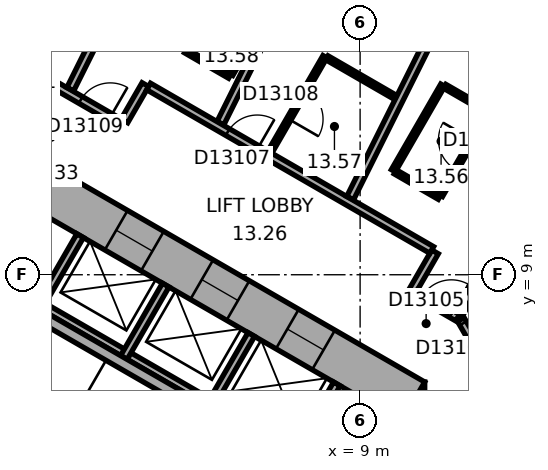
"""IFC4 building model, lengths in metres.
Left out: names, types, materials, properties, quantities, classifications, styles, units other than length and angle.
Written with IfcOpenShell. Run it as: python <this file> out.ifc"""

import sys

from ifc_helpers import new_model, si_unit, direction, frame, frame_2d, origin, place, context, subcontext, project, spatial, rectangle, extrude, element, fill, save


model = new_model("IFC4")
c1 = context("Model", 3, precision=1e-05, world=origin(), true_north=direction((0.0, 1.0)))
c2 = subcontext(c1, "Body", "Model", "MODEL_VIEW")
j1 = project(units=[si_unit("LENGTHUNIT", "METRE"), si_unit("PLANEANGLEUNIT", "RADIAN")], contexts=[c1])
p1 = place(None, origin())
s1 = spatial("IfcSite", under=j1, at=p1, CompositionType="ELEMENT")
p2 = place(p1, origin())
s2 = spatial("IfcBuilding", under=s1, at=p2, CompositionType="ELEMENT")
p3 = place(p2, frame((0.0, 0.0, 63.8)))
s3 = spatial("IfcBuildingStorey", under=s2, at=p3, CompositionType="ELEMENT", Elevation=63.8)
p4 = place(p3, frame((10.1, -6.177, 0.0), z_axis=(0.0, 0.0, 1.0), x_axis=(0.0, 1.0, 0.0)))
e1 = element("IfcWall", 1, at=p4, inside=s3, PredefinedType="SHEAR", context=c2, shape_type="SweptSolid", body=[
    extrude(rectangle(XDim=12.355, YDim=1.2, at=frame_2d((6.177, 0.0))), origin(), (0.0, 0.0, 1.0), 3.3),
])
p5 = place(p4, frame((6.378, 0.0, 0.0)))
e2 = element("IfcOpeningElement", 2, at=p5, cuts=e1, PredefinedType="OPENING", context=c2, shape_type="SweptSolid", body=[
    extrude(rectangle(XDim=1.5, YDim=2.1, at=frame_2d((0.75, 1.05))), frame((0.0, 0.61, 0.0), z_axis=(0.0, -1.0, 0.0), x_axis=(1.0, 0.0, 0.0)), (0.0, 0.0, 1.0), 1.22),
])
p6 = place(p4, frame((1.828, 0.0, 0.0)))
e3 = element("IfcOpeningElement", 3, at=p6, cuts=e1, PredefinedType="OPENING", context=c2, shape_type="SweptSolid", body=[
    extrude(rectangle(XDim=1.1, YDim=2.1, at=frame_2d((0.55, 1.05))), frame((0.0, 0.61, 0.0), z_axis=(0.0, -1.0, 0.0), x_axis=(1.0, 0.0, 0.0)), (0.0, 0.0, 1.0), 1.22),
])
p7 = place(p4, frame((4.427, 0.0, 0.0)))
e4 = element("IfcOpeningElement", 4, at=p7, cuts=e1, PredefinedType="OPENING", context=c2, shape_type="SweptSolid", body=[
    extrude(rectangle(XDim=1.1, YDim=2.1, at=frame_2d((0.55, 1.05))), frame((0.0, 0.61, 0.0), z_axis=(0.0, -1.0, 0.0), x_axis=(1.0, 0.0, 0.0)), (0.0, 0.0, 1.0), 1.22),
])
p8 = place(p3, frame((10.4, 5.658, 0.0), z_axis=(0.0, 0.0, 1.0), x_axis=(-0.866021384402, 0.500006961711, 0.0)))
e5 = element("IfcWall", 5, at=p8, inside=s3, PredefinedType="SHEAR", context=c2, shape_type="SweptSolid", body=[
    extrude(rectangle(XDim=12.355, YDim=1.2, at=frame_2d((6.178, 0.0))), origin(), (0.0, 0.0, 1.0), 3.3),
])
p9 = place(p8, frame((2.728, 0.0, 0.0)))
e6 = element("IfcOpeningElement", 6, at=p9, cuts=e5, PredefinedType="OPENING", context=c2, shape_type="SweptSolid", body=[
    extrude(rectangle(XDim=1.1, YDim=2.1, at=frame_2d((0.55, 1.05))), frame((0.0, 0.61, 0.0), z_axis=(0.0, -1.0, 0.0), x_axis=(1.0, 0.0, 0.0)), (0.0, 0.0, 1.0), 1.22),
])
p10 = place(p8, frame((5.328, 0.0, 0.0)))
e7 = element("IfcOpeningElement", 7, at=p10, cuts=e5, PredefinedType="OPENING", context=c2, shape_type="SweptSolid", body=[
    extrude(rectangle(XDim=1.1, YDim=2.1, at=frame_2d((0.55, 1.05))), frame((0.0, 0.61, 0.0), z_axis=(0.0, -1.0, 0.0), x_axis=(1.0, 0.0, 0.0)), (0.0, 0.0, 1.0), 1.22),
])
p11 = place(p8, frame((7.928, 0.0, 0.0)))
e8 = element("IfcOpeningElement", 8, at=p11, cuts=e5, PredefinedType="OPENING", context=c2, shape_type="SweptSolid", body=[
    extrude(rectangle(XDim=1.1, YDim=2.1, at=frame_2d((0.55, 1.05))), frame((0.0, 0.61, 0.0), z_axis=(0.0, -1.0, 0.0), x_axis=(1.0, 0.0, 0.0)), (0.0, 0.0, 1.0), 1.22),
])
p12 = place(p3, frame((7.424, 4.259, 0.0), z_axis=(0.0, 0.0, 1.0), x_axis=(-0.866026010844, 0.49999894854, 0.0)))
e9 = element("IfcWall", 9, at=p12, inside=s3, PredefinedType="PARTITIONING", context=c2, shape_type="SweptSolid", body=[
    extrude(rectangle(XDim=8.0, YDim=0.2, at=frame_2d((4.0, 0.0))), origin(), (0.0, 0.0, 1.0), 3.05),
])
for number, where, z_axis, x_axis in (
    (10, (7.287, 4.222, 0.0), (0.0, 0.0, 1.0), (0.5, 0.866, 0.0)),
    (11, (5.036, 5.522, 0.0), (0.0, 0.0, 1.0), (0.5, 0.866, 0.0)),
    (12, (2.784, 6.822, 0.0), (0.0, 0.0, 1.0), (0.5, 0.866, 0.0)),
    (13, (0.532, 8.122, 0.0), (0.0, 0.0, 1.0), (0.5, 0.866, 0.0)),
):
    element("IfcWall", number, at=place(p3, frame(where, z_axis=z_axis, x_axis=x_axis)), inside=s3, PredefinedType="PARTITIONING", context=c2, shape_type="SweptSolid", body=[
        extrude(rectangle(XDim=2.2, YDim=0.2, at=frame_2d((1.1, 0.0))), origin(), (0.0, 0.0, 1.0), 3.05),
    ])
p13 = place(p3, frame((6.303, 4.617, 0.0), z_axis=(0.0, 0.0, 1.0), x_axis=(-0.866027801685, 0.499995846692, 0.0)))
e14 = element("IfcWall", 14, at=p13, inside=s3, PredefinedType="SHEAR", context=c2, shape_type="SweptSolid", body=[
    extrude(rectangle(XDim=7.06, YDim=0.3, at=frame_2d((3.53, 0.0))), origin(), (0.0, 0.0, 1.0), 3.05),
])
p14 = place(p3, frame((0.95, 14.001, 0.0), z_axis=(0.0, 0.0, 1.0), x_axis=(-1.0, 0.0, 0.0)))
e15 = element("IfcWall", 15, at=p14, inside=s3, PredefinedType="PARTITIONING", context=c2, shape_type="SweptSolid", body=[
    extrude(rectangle(XDim=1.86, YDim=0.2, at=frame_2d((0.93, 0.0))), origin(), (0.0, 0.0, 1.0), 3.05),
])
p15 = place(p14, frame((0.48, 0.0, 0.0)))
e16 = element("IfcOpeningElement", 16, at=p15, cuts=e15, PredefinedType="OPENING", context=c2, shape_type="SweptSolid", body=[
    extrude(rectangle(XDim=0.9, YDim=2.1, at=frame_2d((0.45, 1.05))), frame((0.0, 0.11, 0.0), z_axis=(0.0, -1.0, 0.0), x_axis=(1.0, 0.0, 0.0)), (0.0, 0.0, 1.0), 0.22),
])
p16 = place(p3, frame((2.748, 12.962, 0.0), z_axis=(0.0, 0.0, 1.0), x_axis=(-0.866013897511, 0.50001992892, 0.0)))
e17 = element("IfcWall", 17, at=p16, inside=s3, PredefinedType="PARTITIONING", context=c2, shape_type="SweptSolid", body=[
    extrude(rectangle(XDim=2.037, YDim=0.2, at=frame_2d((1.018, 0.0))), origin(), (0.0, 0.0, 1.0), 3.05),
])
p17 = place(p16, frame((0.372, 0.0, 0.0)))
e18 = element("IfcOpeningElement", 18, at=p17, cuts=e17, PredefinedType="OPENING", context=c2, shape_type="SweptSolid", body=[
    extrude(rectangle(XDim=0.9, YDim=2.1, at=frame_2d((0.45, 1.05))), frame((0.0, 0.11, 0.0), z_axis=(0.0, -1.0, 0.0), x_axis=(1.0, 0.0, 0.0)), (0.0, 0.0, 1.0), 0.22),
])
p18 = place(p3, frame((3.349, 14.002, 0.0), z_axis=(0.0, 0.0, 1.0), x_axis=(-0.500074377092, -0.865982457891, 0.0)))
e19 = element("IfcWall", 19, at=p18, inside=s3, PredefinedType="PARTITIONING", context=c2, shape_type="SweptSolid", body=[
    extrude(rectangle(XDim=1.101, YDim=0.2, at=frame_2d((0.55, 0.0))), origin(), (0.0, 0.0, 1.0), 3.05),
])
p19 = place(p3, frame((5.351, 21.859, 0.0), z_axis=(0.0, 0.0, 1.0), x_axis=(-0.446205309328, -0.894930624086, 0.0)))
e20 = element("IfcWall", 20, at=p19, inside=s3, PredefinedType="PARTITIONING", context=c2, shape_type="SweptSolid", body=[
    extrude(rectangle(XDim=8.913, YDim=0.2, at=frame_2d((4.457, 0.0))), origin(), (0.0, 0.0, 1.0), 2.6),
])
p20 = place(p3, frame((5.569, 14.222, 0.0), z_axis=(0.0, 0.0, 1.0), x_axis=(-0.866036909293, 0.499980071345, 0.0)))
e21 = element("IfcWall", 21, at=p20, inside=s3, PredefinedType="PARTITIONING", context=c2, shape_type="SweptSolid", body=[
    extrude(rectangle(XDim=1.34, YDim=0.12, at=frame_2d((0.67, 0.0))), origin(), (0.0, 0.0, 1.0), 3.05),
])
p21 = place(p3, frame((6.625, 12.227, 0.0), z_axis=(0.0, 0.0, 1.0), x_axis=(0.500023687443, 0.866011727401, 0.0)))
e22 = element("IfcWall", 22, at=p21, inside=s3, PredefinedType="PARTITIONING", context=c2, shape_type="SweptSolid", body=[
    extrude(rectangle(XDim=2.9, YDim=0.12, at=frame_2d((1.45, 0.0))), origin(), (0.0, 0.0, 1.0), 3.05),
])
p22 = place(p21, frame((1.0, 0.0, 0.0)))
e23 = element("IfcOpeningElement", 23, at=p22, cuts=e22, PredefinedType="OPENING", context=c2, shape_type="SweptSolid", body=[
    extrude(rectangle(XDim=0.9, YDim=2.1, at=frame_2d((0.45, 1.05))), frame((0.0, 0.07, 0.0), z_axis=(0.0, -1.0, 0.0), x_axis=(1.0, 0.0, 0.0)), (0.0, 0.0, 1.0), 0.14),
])
p23 = place(p3, frame((6.839, 16.422, 0.0), z_axis=(0.0, 0.0, 1.0), x_axis=(-0.50000366821, -0.866023285932, 0.0)))
e24 = element("IfcWall", 24, at=p23, inside=s3, PredefinedType="PARTITIONING", context=c2, shape_type="SweptSolid", body=[
    extrude(rectangle(XDim=2.48, YDim=0.12, at=frame_2d((1.24, 0.0))), origin(), (0.0, 0.0, 1.0), 3.05),
])
p24 = place(p3, frame((8.127, 14.708, 0.0), z_axis=(0.0, 0.0, 1.0), x_axis=(0.866065472234, -0.499930592986, 0.0)))
e25 = element("IfcWall", 25, at=p24, inside=s3, PredefinedType="PARTITIONING", context=c2, shape_type="SweptSolid", body=[
    extrude(rectangle(XDim=2.098, YDim=0.12, at=frame_2d((1.049, 0.0))), origin(), (0.0, 0.0, 1.0), 3.05),
])
p25 = place(p3, frame((8.872, 20.104, 0.0), z_axis=(0.0, 0.0, 1.0), x_axis=(-0.446218378653, -0.894924107706, 0.0)))
e26 = element("IfcWall", 26, at=p25, inside=s3, PredefinedType="PARTITIONING", context=c2, shape_type="SweptSolid", body=[
    extrude(rectangle(XDim=7.95, YDim=0.2, at=frame_2d((3.975, 0.0))), origin(), (0.0, 0.0, 1.0), 3.05),
])
p26 = place(p3, frame((9.875, 11.736, 0.0), z_axis=(0.0, 0.0, 1.0), x_axis=(0.499936506574, 0.866062058628, 0.0)))
e27 = element("IfcWall", 27, at=p26, inside=s3, PredefinedType="PARTITIONING", context=c2, shape_type="SweptSolid", body=[
    extrude(rectangle(XDim=2.6, YDim=0.12, at=frame_2d((1.3, 0.0))), origin(), (0.0, 0.0, 1.0), 3.05),
])
p27 = place(p3, frame((10.371, 8.561, 0.0), z_axis=(0.0, 0.0, 1.0), x_axis=(0.499986357472, 0.866033280158, 0.0)))
e28 = element("IfcWall", 28, at=p27, inside=s3, PredefinedType="PARTITIONING", context=c2, shape_type="SweptSolid", body=[
    extrude(rectangle(XDim=1.201, YDim=0.2, at=frame_2d((0.601, 0.0))), origin(), (0.0, 0.0, 1.0), 3.05),
])
p28 = place(p3, frame((10.885, 9.652, 0.0), z_axis=(0.0, 0.0, 1.0), x_axis=(-0.866033868542, 0.499985338323, 0.0)))
e29 = element("IfcWall", 29, at=p28, inside=s3, PredefinedType="PARTITIONING", context=c2, shape_type="SweptSolid", body=[
    extrude(rectangle(XDim=8.602, YDim=0.2, at=frame_2d((4.301, 0.0))), origin(), (0.0, 0.0, 1.0), 3.05),
])
p29 = place(p28, frame((5.302, 0.0, 0.0)))
e30 = element("IfcOpeningElement", 30, at=p29, cuts=e29, PredefinedType="OPENING", context=c2, shape_type="SweptSolid", body=[
    extrude(rectangle(XDim=0.9, YDim=2.1, at=frame_2d((0.45, 1.05))), frame((0.0, 0.11, 0.0), z_axis=(0.0, -1.0, 0.0), x_axis=(1.0, 0.0, 0.0)), (0.0, 0.0, 1.0), 0.22),
])
for number, where, z_axis, x_axis in (
    (31, (11.087, 11.036, 0.0), (0.0, 0.0, 1.0), (-0.866, 0.5, 0.0)),
    (32, (11.226, 13.958, 0.0), (0.0, 0.0, 1.0), (0.866, -0.5, 0.0)),
):
    element("IfcWall", number, at=place(p3, frame(where, z_axis=z_axis, x_axis=x_axis)), inside=s3, PredefinedType="PARTITIONING", context=c2, shape_type="SweptSolid", body=[
        extrude(rectangle(XDim=1.34, YDim=0.12, at=frame_2d((0.67, 0.0))), origin(), (0.0, 0.0, 1.0), 3.05),
    ])
p30 = place(p3, frame((11.566, 7.871, 0.0), z_axis=(0.0, 0.0, 1.0), x_axis=(-0.866004557827, 0.500036104519, 0.0)))
e33 = element("IfcWall", 33, at=p30, inside=s3, PredefinedType="PARTITIONING", context=c2, shape_type="SweptSolid", body=[
    extrude(rectangle(XDim=1.28, YDim=0.2, at=frame_2d((0.64, 0.0))), origin(), (0.0, 0.0, 1.0), 3.05),
])
p31 = place(p30, frame((0.19, 0.0, 0.0)))
e34 = element("IfcOpeningElement", 34, at=p31, cuts=e33, PredefinedType="OPENING", context=c2, shape_type="SweptSolid", body=[
    extrude(rectangle(XDim=0.9, YDim=2.1, at=frame_2d((0.45, 1.05))), frame((0.0, 0.11, 0.0), z_axis=(0.0, -1.0, 0.0), x_axis=(1.0, 0.0, 0.0)), (0.0, 0.0, 1.0), 0.22),
])
p32 = place(p3, frame((12.357, 13.236, 0.0), z_axis=(0.0, 0.0, 1.0), x_axis=(-0.50000366821, -0.866023285932, 0.0)))
e35 = element("IfcWall", 35, at=p32, inside=s3, PredefinedType="PARTITIONING", context=c2, shape_type="SweptSolid", body=[
    extrude(rectangle(XDim=2.48, YDim=0.12, at=frame_2d((1.24, 0.0))), origin(), (0.0, 0.0, 1.0), 3.05),
])
p33 = place(p32, frame((0.79, 0.0, 0.0)))
e36 = element("IfcOpeningElement", 36, at=p33, cuts=e35, PredefinedType="OPENING", context=c2, shape_type="SweptSolid", body=[
    extrude(rectangle(XDim=0.9, YDim=2.1, at=frame_2d((0.45, 1.05))), frame((0.0, 0.07, 0.0), z_axis=(0.0, -1.0, 0.0), x_axis=(1.0, 0.0, 0.0)), (0.0, 0.0, 1.0), 0.14),
])
p34 = place(p3, frame((12.393, 18.348, 0.0), z_axis=(0.0, 0.0, 1.0), x_axis=(-0.446176022699, -0.894945225569, 0.0)))
e37 = element("IfcWall", 37, at=p34, inside=s3, PredefinedType="PARTITIONING", context=c2, shape_type="SweptSolid", body=[
    extrude(rectangle(XDim=8.191, YDim=0.2, at=frame_2d((4.095, 0.0))), origin(), (0.0, 0.0, 1.0), 2.6),
])
p35 = place(p3, frame((12.58, 6.212, 0.0), z_axis=(0.0, 0.0, 1.0), x_axis=(-0.500063286585, 0.865988862174, 0.0)))
e38 = element("IfcWall", 38, at=p35, inside=s3, PredefinedType="PARTITIONING", context=c2, shape_type="SweptSolid", body=[
    extrude(rectangle(XDim=1.86, YDim=0.2, at=frame_2d((0.93, 0.0))), origin(), (0.0, 0.0, 1.0), 3.05),
])
p36 = place(p35, frame((0.842, 0.0, 0.0)))
e39 = element("IfcOpeningElement", 39, at=p36, cuts=e38, PredefinedType="OPENING", context=c2, shape_type="SweptSolid", body=[
    extrude(rectangle(XDim=0.9, YDim=2.1, at=frame_2d((0.45, 1.05))), frame((0.0, 0.11, 0.0), z_axis=(0.0, -1.0, 0.0), x_axis=(1.0, 0.0, 0.0)), (0.0, 0.0, 1.0), 0.22),
])
p37 = place(p3, frame((15.915, 16.592, 0.0), z_axis=(0.0, 0.0, 1.0), x_axis=(-0.446199736347, -0.894933402709, 0.0)))
e40 = element("IfcWall", 40, at=p37, inside=s3, PredefinedType="PARTITIONING", context=c2, shape_type="SweptSolid", body=[
    extrude(rectangle(XDim=9.635, YDim=0.2, at=frame_2d((4.817, 0.0))), origin(), (0.0, 0.0, 1.0), 3.05),
])
p38 = place(p9, origin())
e41 = element("IfcDoor", 41, at=p38, inside=s3, OperationType="DOUBLE_DOOR_SLIDING", PredefinedType="DOOR", context=c2, shape_type="SweptSolid", body=[
    extrude(rectangle(XDim=1.1, YDim=2.1, at=frame_2d((0.55, 1.05))), frame((0.0, 0.025, 0.0), z_axis=(0.0, -1.0, 0.0), x_axis=(1.0, 0.0, 0.0)), (0.0, 0.0, 1.0), 0.05),
])
fill(e6, e41)
p39 = place(p10, origin())
e42 = element("IfcDoor", 42, at=p39, inside=s3, OperationType="DOUBLE_DOOR_SLIDING", PredefinedType="DOOR", context=c2, shape_type="SweptSolid", body=[
    extrude(rectangle(XDim=1.1, YDim=2.1, at=frame_2d((0.55, 1.05))), frame((0.0, 0.025, 0.0), z_axis=(0.0, -1.0, 0.0), x_axis=(1.0, 0.0, 0.0)), (0.0, 0.0, 1.0), 0.05),
])
fill(e7, e42)
p40 = place(p11, origin())
e43 = element("IfcDoor", 43, at=p40, inside=s3, OperationType="DOUBLE_DOOR_SLIDING", PredefinedType="DOOR", context=c2, shape_type="SweptSolid", body=[
    extrude(rectangle(XDim=1.1, YDim=2.1, at=frame_2d((0.55, 1.05))), frame((0.0, 0.025, 0.0), z_axis=(0.0, -1.0, 0.0), x_axis=(1.0, 0.0, 0.0)), (0.0, 0.0, 1.0), 0.05),
])
fill(e8, e43)
p41 = place(p36, origin())
e44 = element("IfcDoor", 44, at=p41, inside=s3, OperationType="SINGLE_SWING_LEFT", PredefinedType="DOOR", context=c2, shape_type="SweptSolid", body=[
    extrude(rectangle(XDim=0.9, YDim=2.1, at=frame_2d((0.45, 1.05))), frame((0.0, 0.025, 0.0), z_axis=(0.0, -1.0, 0.0), x_axis=(1.0, 0.0, 0.0)), (0.0, 0.0, 1.0), 0.05),
])
fill(e39, e44)
p42 = place(p31, origin())
e45 = element("IfcDoor", 45, at=p42, inside=s3, OperationType="SINGLE_SWING_LEFT", PredefinedType="DOOR", context=c2, shape_type="SweptSolid", body=[
    extrude(rectangle(XDim=0.9, YDim=2.1, at=frame_2d((0.45, 1.05))), frame((0.0, 0.025, 0.0), z_axis=(0.0, -1.0, 0.0), x_axis=(1.0, 0.0, 0.0)), (0.0, 0.0, 1.0), 0.05),
])
fill(e34, e45)
p43 = place(p33, origin())
e46 = element("IfcDoor", 46, at=p43, inside=s3, OperationType="SINGLE_SWING_LEFT", PredefinedType="DOOR", context=c2, shape_type="SweptSolid", body=[
    extrude(rectangle(XDim=0.9, YDim=2.1, at=frame_2d((0.45, 1.05))), frame((0.0, 0.025, 0.0), z_axis=(0.0, -1.0, 0.0), x_axis=(1.0, 0.0, 0.0)), (0.0, 0.0, 1.0), 0.05),
])
fill(e36, e46)
p44 = place(p29, origin())
e47 = element("IfcDoor", 47, at=p44, inside=s3, OperationType="SINGLE_SWING_LEFT", PredefinedType="DOOR", context=c2, shape_type="SweptSolid", body=[
    extrude(rectangle(XDim=0.9, YDim=2.1, at=frame_2d((0.45, 1.05))), frame((0.0, 0.025, 0.0), z_axis=(0.0, -1.0, 0.0), x_axis=(1.0, 0.0, 0.0)), (0.0, 0.0, 1.0), 0.05),
])
fill(e30, e47)
p45 = place(p22, origin())
e48 = element("IfcDoor", 48, at=p45, inside=s3, OperationType="SINGLE_SWING_LEFT", PredefinedType="DOOR", context=c2, shape_type="SweptSolid", body=[
    extrude(rectangle(XDim=0.9, YDim=2.1, at=frame_2d((0.45, 1.05))), frame((0.0, 0.025, 0.0), z_axis=(0.0, -1.0, 0.0), x_axis=(1.0, 0.0, 0.0)), (0.0, 0.0, 1.0), 0.05),
])
fill(e23, e48)
p46 = place(p17, origin())
e49 = element("IfcDoor", 49, at=p46, inside=s3, OperationType="SINGLE_SWING_LEFT", PredefinedType="DOOR", context=c2, shape_type="SweptSolid", body=[
    extrude(rectangle(XDim=0.9, YDim=2.1, at=frame_2d((0.45, 1.05))), frame((0.0, 0.025, 0.0), z_axis=(0.0, -1.0, 0.0), x_axis=(1.0, 0.0, 0.0)), (0.0, 0.0, 1.0), 0.05),
])
fill(e18, e49)
save(model, sys.argv[1])
